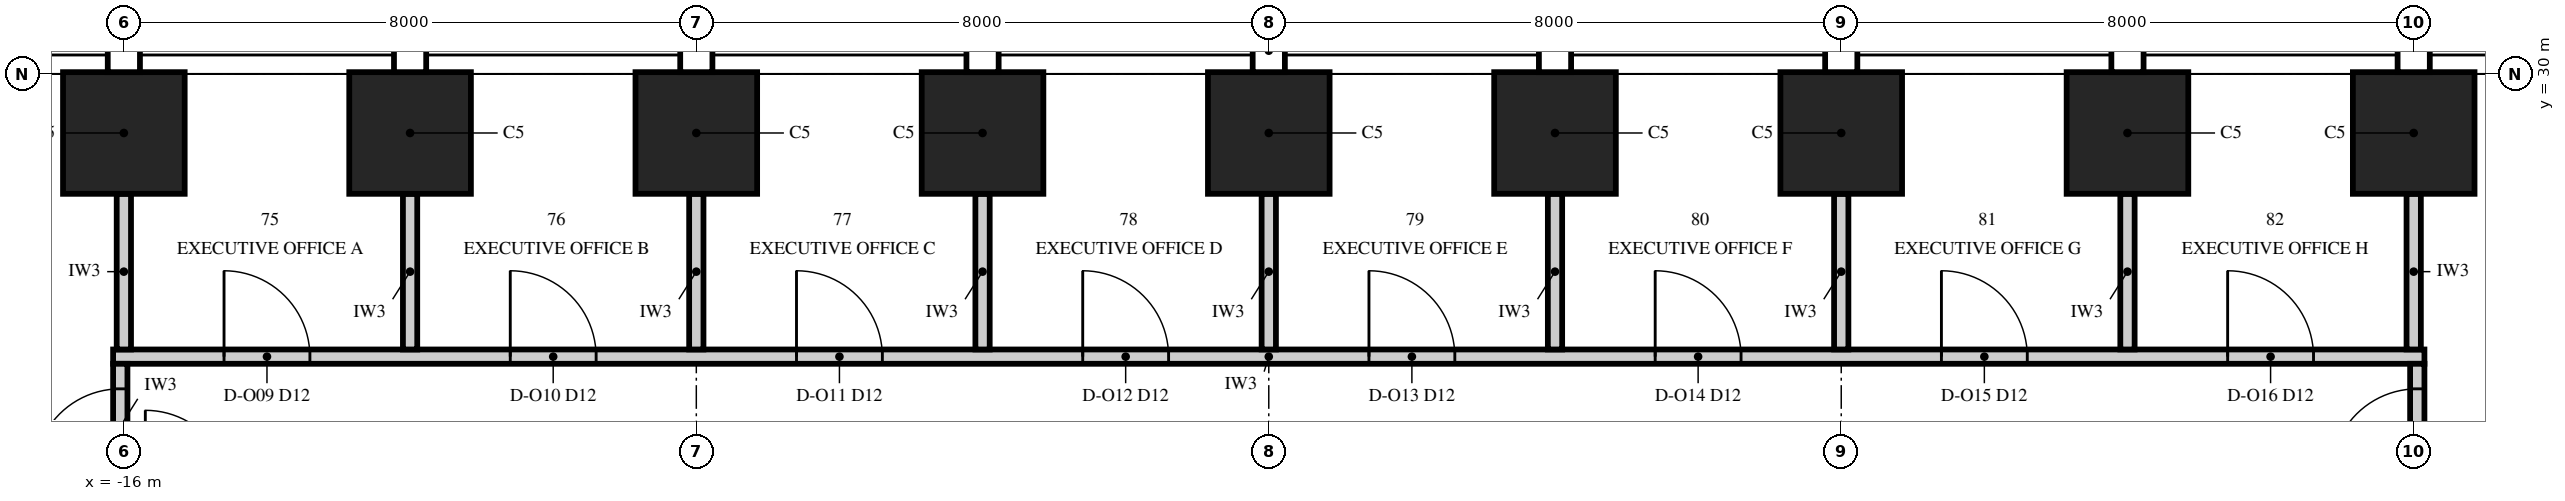
"""IFC4 building model, lengths in metres.
Left out: names, types, materials, properties, quantities, classifications, styles, units other than length and angle.
Written with IfcOpenShell. Run it as: python <this file> out.ifc"""

import sys

from ifc_helpers import new_model, si_unit, direction, frame, frame_2d, origin, origin_2d, place, context, subcontext, project, spatial, rectangle, extrude, element, fill, save


model = new_model("IFC4")
c1 = context("Model", 3, precision=1e-05, world=origin(), true_north=direction((0.0, 1.0)))
c2 = subcontext(c1, "Body", "Model", "MODEL_VIEW")
j1 = project(units=[si_unit("LENGTHUNIT", "METRE"), si_unit("PLANEANGLEUNIT", "RADIAN")], contexts=[c1])
p1 = place(None, origin())
s1 = spatial("IfcSite", under=j1, at=p1, CompositionType="ELEMENT")
p2 = place(p1, origin())
s2 = spatial("IfcBuilding", under=s1, at=p2, CompositionType="ELEMENT")
p3 = place(p2, frame((0.0, 0.0, 312.0)))
s3 = spatial("IfcBuildingStorey", under=s2, at=p3, CompositionType="ELEMENT", Elevation=312.0)
for number, where, z_axis, x_axis in (
    (1, (16.0, 29.175, 0.0), (0.0, 0.0, 1.0), (-1.0, 0.0, 0.0)),
    (2, (12.0, 29.175, 0.0), (0.0, 0.0, 1.0), (-1.0, 0.0, 0.0)),
    (3, (8.0, 29.175, 0.0), (0.0, 0.0, 1.0), (-1.0, 0.0, 0.0)),
    (4, (4.0, 29.175, 0.0), (0.0, 0.0, 1.0), (-1.0, 0.0, 0.0)),
    (5, (0.0, 29.175, 0.0), (0.0, 0.0, 1.0), (-1.0, 0.0, 0.0)),
    (6, (-4.0, 29.175, 0.0), (0.0, 0.0, 1.0), (-1.0, 0.0, 0.0)),
    (7, (-8.0, 29.175, 0.0), (0.0, 0.0, 1.0), (-1.0, 0.0, 0.0)),
    (8, (-12.0, 29.175, 0.0), (0.0, 0.0, 1.0), (-1.0, 0.0, 0.0)),
    (9, (-16.0, 29.175, 0.0), (0.0, 0.0, 1.0), (-1.0, 0.0, 0.0)),
):
    element("IfcColumn", number, at=place(p3, frame(where, z_axis=z_axis, x_axis=x_axis)), inside=s3, PredefinedType="COLUMN", context=c2, shape_type="SweptSolid", body=[
        extrude(rectangle(XDim=1.7, YDim=1.7, at=origin_2d()), origin(), (0.0, 0.0, 1.0), 4.0),
    ])
p4 = place(p3, frame((-16.15, 26.05, 0.0), z_axis=(0.0, 0.0, 1.0), x_axis=(1.0, 0.0, 0.0)))
e10 = element("IfcWall", 10, at=p4, inside=s3, PredefinedType="PARTITIONING", context=c2, shape_type="SweptSolid", body=[
    extrude(rectangle(XDim=32.3, YDim=0.2, at=frame_2d((16.15, 0.0))), origin(), (0.0, 0.0, 1.0), 3.418),
])
p5 = place(p4, frame((1.55, 0.0, 0.0)))
e11 = element("IfcOpeningElement", 11, at=p5, cuts=e10, PredefinedType="OPENING", context=c2, shape_type="SweptSolid", body=[
    extrude(rectangle(XDim=1.2, YDim=2.4, at=frame_2d((0.6, 1.2))), frame((0.0, 0.115, 0.0), z_axis=(0.0, -1.0, 0.0), x_axis=(1.0, 0.0, 0.0)), (0.0, 0.0, 1.0), 0.23),
])
p6 = place(p4, frame((5.55, 0.0, 0.0)))
e12 = element("IfcOpeningElement", 12, at=p6, cuts=e10, PredefinedType="OPENING", context=c2, shape_type="SweptSolid", body=[
    extrude(rectangle(XDim=1.2, YDim=2.4, at=frame_2d((0.6, 1.2))), frame((0.0, 0.115, 0.0), z_axis=(0.0, -1.0, 0.0), x_axis=(1.0, 0.0, 0.0)), (0.0, 0.0, 1.0), 0.23),
])
p7 = place(p4, frame((9.55, 0.0, 0.0)))
e13 = element("IfcOpeningElement", 13, at=p7, cuts=e10, PredefinedType="OPENING", context=c2, shape_type="SweptSolid", body=[
    extrude(rectangle(XDim=1.2, YDim=2.4, at=frame_2d((0.6, 1.2))), frame((0.0, 0.115, 0.0), z_axis=(0.0, -1.0, 0.0), x_axis=(1.0, 0.0, 0.0)), (0.0, 0.0, 1.0), 0.23),
])
p8 = place(p4, frame((13.55, 0.0, 0.0)))
e14 = element("IfcOpeningElement", 14, at=p8, cuts=e10, PredefinedType="OPENING", context=c2, shape_type="SweptSolid", body=[
    extrude(rectangle(XDim=1.2, YDim=2.4, at=frame_2d((0.6, 1.2))), frame((0.0, 0.115, 0.0), z_axis=(0.0, -1.0, 0.0), x_axis=(1.0, 0.0, 0.0)), (0.0, 0.0, 1.0), 0.23),
])
p9 = place(p4, frame((17.55, 0.0, 0.0)))
e15 = element("IfcOpeningElement", 15, at=p9, cuts=e10, PredefinedType="OPENING", context=c2, shape_type="SweptSolid", body=[
    extrude(rectangle(XDim=1.2, YDim=2.4, at=frame_2d((0.6, 1.2))), frame((0.0, 0.115, 0.0), z_axis=(0.0, -1.0, 0.0), x_axis=(1.0, 0.0, 0.0)), (0.0, 0.0, 1.0), 0.23),
])
p10 = place(p4, frame((21.55, 0.0, 0.0)))
e16 = element("IfcOpeningElement", 16, at=p10, cuts=e10, PredefinedType="OPENING", context=c2, shape_type="SweptSolid", body=[
    extrude(rectangle(XDim=1.2, YDim=2.4, at=frame_2d((0.6, 1.2))), frame((0.0, 0.115, 0.0), z_axis=(0.0, -1.0, 0.0), x_axis=(1.0, 0.0, 0.0)), (0.0, 0.0, 1.0), 0.23),
])
p11 = place(p4, frame((25.55, 0.0, 0.0)))
e17 = element("IfcOpeningElement", 17, at=p11, cuts=e10, PredefinedType="OPENING", context=c2, shape_type="SweptSolid", body=[
    extrude(rectangle(XDim=1.2, YDim=2.4, at=frame_2d((0.6, 1.2))), frame((0.0, 0.115, 0.0), z_axis=(0.0, -1.0, 0.0), x_axis=(1.0, 0.0, 0.0)), (0.0, 0.0, 1.0), 0.23),
])
p12 = place(p4, frame((29.55, 0.0, 0.0)))
e18 = element("IfcOpeningElement", 18, at=p12, cuts=e10, PredefinedType="OPENING", context=c2, shape_type="SweptSolid", body=[
    extrude(rectangle(XDim=1.2, YDim=2.4, at=frame_2d((0.6, 1.2))), frame((0.0, 0.115, 0.0), z_axis=(0.0, -1.0, 0.0), x_axis=(1.0, 0.0, 0.0)), (0.0, 0.0, 1.0), 0.23),
])
p13 = place(p3, frame((-16.05, 24.2, 0.0), z_axis=(0.0, 0.0, 1.0), x_axis=(0.0, 1.0, 0.0)))
e19 = element("IfcWall", 19, at=p13, inside=s3, PredefinedType="PARTITIONING", context=c2, shape_type="SweptSolid", body=[
    extrude(rectangle(XDim=1.75, YDim=0.2, at=frame_2d((0.875, 0.0))), origin(), (0.0, 0.0, 1.0), 3.326),
])
p14 = place(p13, frame((0.2, 0.0, 0.0)))
e20 = element("IfcOpeningElement", 20, at=p14, cuts=e19, PredefinedType="OPENING", context=c2, shape_type="SweptSolid", body=[
    extrude(rectangle(XDim=1.2, YDim=2.4, at=frame_2d((0.6, 1.2))), frame((0.0, 0.115, 0.0), z_axis=(0.0, -1.0, 0.0), x_axis=(1.0, 0.0, 0.0)), (0.0, 0.0, 1.0), 0.23),
])
for number, where, z_axis, x_axis in (
    (21, (-16.0, 26.15, 0.0), (0.0, 0.0, 1.0), (0.0, 1.0, 0.0)),
    (22, (-12.0, 26.15, 0.0), (0.0, 0.0, 1.0), (0.0, 1.0, 0.0)),
    (23, (-8.0, 26.15, 0.0), (0.0, 0.0, 1.0), (0.0, 1.0, 0.0)),
    (24, (-4.0, 26.15, 0.0), (0.0, 0.0, 1.0), (0.0, 1.0, 0.0)),
    (25, (0.0, 26.15, 0.0), (0.0, 0.0, 1.0), (0.0, 1.0, 0.0)),
    (26, (4.0, 26.15, 0.0), (0.0, 0.0, 1.0), (0.0, 1.0, 0.0)),
    (27, (8.0, 26.15, 0.0), (0.0, 0.0, 1.0), (0.0, 1.0, 0.0)),
    (28, (12.0, 26.15, 0.0), (0.0, 0.0, 1.0), (0.0, 1.0, 0.0)),
    (29, (16.0, 26.15, 0.0), (0.0, 0.0, 1.0), (0.0, 1.0, 0.0)),
):
    element("IfcWall", number, at=place(p3, frame(where, z_axis=z_axis, x_axis=x_axis)), inside=s3, PredefinedType="PARTITIONING", context=c2, shape_type="SweptSolid", body=[
        extrude(rectangle(XDim=2.175, YDim=0.2, at=frame_2d((1.087, 0.0))), origin(), (0.0, 0.0, 1.0), 3.418),
    ])
p15 = place(p3, frame((16.05, 9.9, 0.0), z_axis=(0.0, 0.0, 1.0), x_axis=(0.0, 1.0, 0.0)))
e30 = element("IfcWall", 30, at=p15, inside=s3, PredefinedType="PARTITIONING", context=c2, shape_type="SweptSolid", body=[
    extrude(rectangle(XDim=16.05, YDim=0.2, at=frame_2d((8.025, 0.0))), origin(), (0.0, 0.0, 1.0), 3.23),
])
p16 = place(p15, frame((14.5, 0.0, 0.0)))
e31 = element("IfcOpeningElement", 31, at=p16, cuts=e30, PredefinedType="OPENING", context=c2, shape_type="SweptSolid", body=[
    extrude(rectangle(XDim=1.2, YDim=2.4, at=frame_2d((0.6, 1.2))), frame((0.0, 0.115, 0.0), z_axis=(0.0, -1.0, 0.0), x_axis=(1.0, 0.0, 0.0)), (0.0, 0.0, 1.0), 0.23),
])
p17 = place(p15, frame((7.85, 0.0, 0.0)))
e32 = element("IfcOpeningElement", 32, at=p17, cuts=e30, PredefinedType="OPENING", context=c2, shape_type="SweptSolid", body=[
    extrude(rectangle(XDim=1.2, YDim=2.4, at=frame_2d((0.6, 1.2))), frame((0.0, 0.115, 0.0), z_axis=(0.0, -1.0, 0.0), x_axis=(1.0, 0.0, 0.0)), (0.0, 0.0, 1.0), 0.23),
])
p18 = place(p5, origin())
e33 = element("IfcDoor", 33, at=p18, inside=s3, OperationType="SINGLE_SWING_LEFT", PredefinedType="DOOR", context=c2, shape_type="SweptSolid", body=[
    extrude(rectangle(XDim=1.2, YDim=2.4, at=frame_2d((0.6, 1.2))), frame((0.0, 0.1, 0.0), z_axis=(0.0, -1.0, 0.0), x_axis=(1.0, 0.0, 0.0)), (0.0, 0.0, 1.0), 0.199),
])
fill(e11, e33)
p19 = place(p6, origin())
e34 = element("IfcDoor", 34, at=p19, inside=s3, OperationType="SINGLE_SWING_LEFT", PredefinedType="DOOR", context=c2, shape_type="SweptSolid", body=[
    extrude(rectangle(XDim=1.2, YDim=2.4, at=frame_2d((0.6, 1.2))), frame((0.0, 0.1, 0.0), z_axis=(0.0, -1.0, 0.0), x_axis=(1.0, 0.0, 0.0)), (0.0, 0.0, 1.0), 0.199),
])
fill(e12, e34)
p20 = place(p7, origin())
e35 = element("IfcDoor", 35, at=p20, inside=s3, OperationType="SINGLE_SWING_LEFT", PredefinedType="DOOR", context=c2, shape_type="SweptSolid", body=[
    extrude(rectangle(XDim=1.2, YDim=2.4, at=frame_2d((0.6, 1.2))), frame((0.0, 0.1, 0.0), z_axis=(0.0, -1.0, 0.0), x_axis=(1.0, 0.0, 0.0)), (0.0, 0.0, 1.0), 0.199),
])
fill(e13, e35)
p21 = place(p8, origin())
e36 = element("IfcDoor", 36, at=p21, inside=s3, OperationType="SINGLE_SWING_LEFT", PredefinedType="DOOR", context=c2, shape_type="SweptSolid", body=[
    extrude(rectangle(XDim=1.2, YDim=2.4, at=frame_2d((0.6, 1.2))), frame((0.0, 0.1, 0.0), z_axis=(0.0, -1.0, 0.0), x_axis=(1.0, 0.0, 0.0)), (0.0, 0.0, 1.0), 0.199),
])
fill(e14, e36)
p22 = place(p9, origin())
e37 = element("IfcDoor", 37, at=p22, inside=s3, OperationType="SINGLE_SWING_LEFT", PredefinedType="DOOR", context=c2, shape_type="SweptSolid", body=[
    extrude(rectangle(XDim=1.2, YDim=2.4, at=frame_2d((0.6, 1.2))), frame((0.0, 0.1, 0.0), z_axis=(0.0, -1.0, 0.0), x_axis=(1.0, 0.0, 0.0)), (0.0, 0.0, 1.0), 0.199),
])
fill(e15, e37)
p23 = place(p10, origin())
e38 = element("IfcDoor", 38, at=p23, inside=s3, OperationType="SINGLE_SWING_LEFT", PredefinedType="DOOR", context=c2, shape_type="SweptSolid", body=[
    extrude(rectangle(XDim=1.2, YDim=2.4, at=frame_2d((0.6, 1.2))), frame((0.0, 0.1, 0.0), z_axis=(0.0, -1.0, 0.0), x_axis=(1.0, 0.0, 0.0)), (0.0, 0.0, 1.0), 0.199),
])
fill(e16, e38)
p24 = place(p11, origin())
e39 = element("IfcDoor", 39, at=p24, inside=s3, OperationType="SINGLE_SWING_LEFT", PredefinedType="DOOR", context=c2, shape_type="SweptSolid", body=[
    extrude(rectangle(XDim=1.2, YDim=2.4, at=frame_2d((0.6, 1.2))), frame((0.0, 0.1, 0.0), z_axis=(0.0, -1.0, 0.0), x_axis=(1.0, 0.0, 0.0)), (0.0, 0.0, 1.0), 0.199),
])
fill(e17, e39)
p25 = place(p12, origin())
e40 = element("IfcDoor", 40, at=p25, inside=s3, OperationType="SINGLE_SWING_LEFT", PredefinedType="DOOR", context=c2, shape_type="SweptSolid", body=[
    extrude(rectangle(XDim=1.2, YDim=2.4, at=frame_2d((0.6, 1.2))), frame((0.0, 0.1, 0.0), z_axis=(0.0, -1.0, 0.0), x_axis=(1.0, 0.0, 0.0)), (0.0, 0.0, 1.0), 0.199),
])
fill(e18, e40)
p26 = place(p14, origin())
e41 = element("IfcDoor", 41, at=p26, inside=s3, OperationType="SINGLE_SWING_LEFT", PredefinedType="DOOR", context=c2, shape_type="SweptSolid", body=[
    extrude(rectangle(XDim=1.2, YDim=2.4, at=frame_2d((0.6, 1.2))), frame((0.0, 0.1, 0.0), z_axis=(0.0, -1.0, 0.0), x_axis=(1.0, 0.0, 0.0)), (0.0, 0.0, 1.0), 0.199),
])
fill(e20, e41)
p27 = place(p16, origin())
e42 = element("IfcDoor", 42, at=p27, inside=s3, OperationType="SINGLE_SWING_LEFT", PredefinedType="DOOR", context=c2, shape_type="SweptSolid", body=[
    extrude(rectangle(XDim=1.2, YDim=2.4, at=frame_2d((0.6, 1.2))), frame((0.0, 0.1, 0.0), z_axis=(0.0, -1.0, 0.0), x_axis=(1.0, 0.0, 0.0)), (0.0, 0.0, 1.0), 0.199),
])
fill(e31, e42)
save(model, sys.argv[1])
